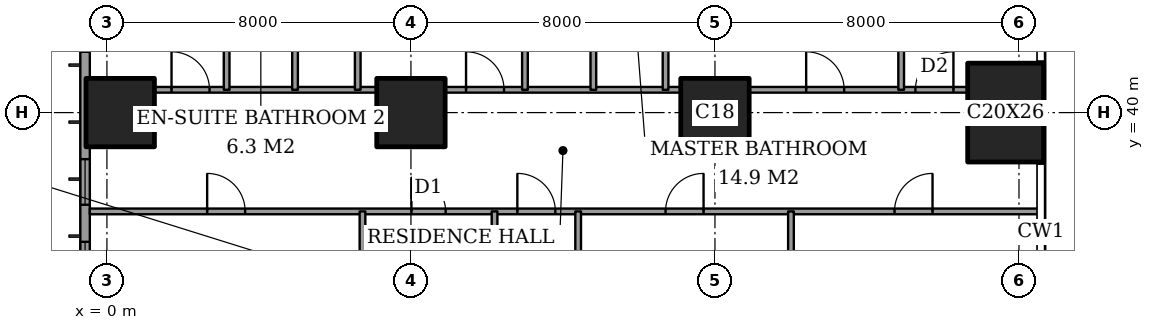
"""IFC4 building model, lengths in metres.
Left out: names, types, materials, properties, quantities, classifications, styles, units other than length and angle.
Written with IfcOpenShell. Run it as: python <this file> out.ifc"""

import sys

from ifc_helpers import new_model, si_unit, direction, frame, frame_2d, origin, origin_2d, place, context, subcontext, project, spatial, rectangle, extrude, element, fill, save


model = new_model("IFC4")
c1 = context("Model", 3, precision=1e-05, world=origin(), true_north=direction((0.0, 1.0)))
c2 = subcontext(c1, "Body", "Model", "MODEL_VIEW")
j1 = project(units=[si_unit("LENGTHUNIT", "METRE"), si_unit("PLANEANGLEUNIT", "RADIAN")], contexts=[c1])
p1 = place(None, origin())
s1 = spatial("IfcSite", under=j1, at=p1, CompositionType="ELEMENT")
p2 = place(p1, origin())
s2 = spatial("IfcBuilding", under=s1, at=p2, CompositionType="ELEMENT")
p3 = place(p2, frame((0.0, 0.0, 196.6)))
s3 = spatial("IfcBuildingStorey", under=s2, at=p3, CompositionType="ELEMENT", Elevation=196.6)
for number, where, z_axis, x_axis in (
    (1, (0.35, 40.0, 0.0), (0.0, 0.0, 1.0), (1.0, 0.0, 0.0)),
    (2, (8.0, 40.0, 0.0), (0.0, 0.0, 1.0), (1.0, 0.0, 0.0)),
    (3, (16.0, 40.0, 0.0), (0.0, 0.0, 1.0), (1.0, 0.0, 0.0)),
):
    element("IfcColumn", number, at=place(p3, frame(where, z_axis=z_axis, x_axis=x_axis)), inside=s3, PredefinedType="COLUMN", context=c2, shape_type="SweptSolid", body=[
        extrude(rectangle(XDim=1.8, YDim=1.8, at=origin_2d()), origin(), (0.0, 0.0, 1.0), 3.6),
    ])
p4 = place(p3, frame((23.65, 40.0, 0.0), z_axis=(0.0, 0.0, 1.0), x_axis=(1.0, 0.0, 0.0)))
e4 = element("IfcColumn", 4, at=p4, inside=s3, PredefinedType="COLUMN", context=c2, shape_type="SweptSolid", body=[
    extrude(rectangle(XDim=2.0, YDim=2.6, at=origin_2d()), origin(), (0.0, 0.0, 1.0), 3.6),
])
p5 = place(p3, frame((-0.575, 44.825, 0.0), z_axis=(0.0, 0.0, 1.0), x_axis=(0.0, -1.0, 0.0)))
e5 = element("IfcWall", 5, at=p5, inside=s3, PredefinedType="SOLIDWALL", context=c2, shape_type="SweptSolid", body=[
    extrude(rectangle(XDim=41.65, YDim=0.25, at=frame_2d((20.825, 0.0))), origin(), (0.0, 0.0, 1.0), 3.6),
])
p6 = place(p5, frame((0.825, 0.0, 0.2)))
e6 = element("IfcOpeningElement", 6, at=p6, cuts=e5, PredefinedType="OPENING", context=c2, shape_type="SweptSolid", body=[
    extrude(rectangle(XDim=2.4, YDim=2.4, at=frame_2d((1.2, 1.2))), frame((0.0, 0.135, 0.0), z_axis=(0.0, -1.0, 0.0), x_axis=(1.0, 0.0, 0.0)), (0.0, 0.0, 1.0), 0.27),
])
p7 = place(p5, frame((6.05, 0.0, 0.2)))
e7 = element("IfcOpeningElement", 7, at=p7, cuts=e5, PredefinedType="OPENING", context=c2, shape_type="SweptSolid", body=[
    extrude(rectangle(XDim=1.2, YDim=2.4, at=frame_2d((0.6, 1.2))), frame((0.0, 0.135, 0.0), z_axis=(0.0, -1.0, 0.0), x_axis=(1.0, 0.0, 0.0)), (0.0, 0.0, 1.0), 0.27),
])
p8 = place(p5, frame((8.225, 0.0, 0.2)))
e8 = element("IfcOpeningElement", 8, at=p8, cuts=e5, PredefinedType="OPENING", context=c2, shape_type="SweptSolid", body=[
    extrude(rectangle(XDim=2.4, YDim=2.4, at=frame_2d((1.2, 1.2))), frame((0.0, 0.135, 0.0), z_axis=(0.0, -1.0, 0.0), x_axis=(1.0, 0.0, 0.0)), (0.0, 0.0, 1.0), 0.27),
])
p9 = place(p5, frame((15.625, 0.0, 0.2)))
e9 = element("IfcOpeningElement", 9, at=p9, cuts=e5, PredefinedType="OPENING", context=c2, shape_type="SweptSolid", body=[
    extrude(rectangle(XDim=2.4, YDim=2.4, at=frame_2d((1.2, 1.2))), frame((0.0, 0.135, 0.0), z_axis=(0.0, -1.0, 0.0), x_axis=(1.0, 0.0, 0.0)), (0.0, 0.0, 1.0), 0.27),
])
p10 = place(p5, frame((23.625, 0.0, 0.2)))
e10 = element("IfcOpeningElement", 10, at=p10, cuts=e5, PredefinedType="OPENING", context=c2, shape_type="SweptSolid", body=[
    extrude(rectangle(XDim=2.4, YDim=2.4, at=frame_2d((1.2, 1.2))), frame((0.0, 0.135, 0.0), z_axis=(0.0, -1.0, 0.0), x_axis=(1.0, 0.0, 0.0)), (0.0, 0.0, 1.0), 0.27),
])
p11 = place(p5, frame((30.775, 0.0, 0.2)))
e11 = element("IfcOpeningElement", 11, at=p11, cuts=e5, PredefinedType="OPENING", context=c2, shape_type="SweptSolid", body=[
    extrude(rectangle(XDim=2.4, YDim=2.4, at=frame_2d((1.2, 1.2))), frame((0.0, 0.135, 0.0), z_axis=(0.0, -1.0, 0.0), x_axis=(1.0, 0.0, 0.0)), (0.0, 0.0, 1.0), 0.27),
])
p12 = place(p5, frame((34.55, 0.0, 0.2)))
e12 = element("IfcOpeningElement", 12, at=p12, cuts=e5, PredefinedType="OPENING", context=c2, shape_type="SweptSolid", body=[
    extrude(rectangle(XDim=1.2, YDim=2.4, at=frame_2d((0.6, 1.2))), frame((0.0, 0.135, 0.0), z_axis=(0.0, -1.0, 0.0), x_axis=(1.0, 0.0, 0.0)), (0.0, 0.0, 1.0), 0.27),
])
p13 = place(p5, frame((38.425, 0.0, 0.2)))
e13 = element("IfcOpeningElement", 13, at=p13, cuts=e5, PredefinedType="OPENING", context=c2, shape_type="SweptSolid", body=[
    extrude(rectangle(XDim=2.4, YDim=2.4, at=frame_2d((1.2, 1.2))), frame((0.0, 0.135, 0.0), z_axis=(0.0, -1.0, 0.0), x_axis=(1.0, 0.0, 0.0)), (0.0, 0.0, 1.0), 0.27),
])
p14 = place(p3, frame((-0.45, 37.4, 0.0), z_axis=(0.0, 0.0, 1.0), x_axis=(1.0, 0.0, 0.0)))
e14 = element("IfcWall", 14, at=p14, inside=s3, PredefinedType="PARTITIONING", context=c2, shape_type="SweptSolid", body=[
    extrude(rectangle(XDim=25.011, YDim=0.15, at=frame_2d((12.505, 0.0))), origin(), (0.0, 0.0, 1.0), 3.35),
])
p15 = place(p14, frame((11.25, 0.0, 0.0)))
e15 = element("IfcOpeningElement", 15, at=p15, cuts=e14, PredefinedType="OPENING", context=c2, shape_type="SweptSolid", body=[
    extrude(rectangle(XDim=1.0, YDim=2.1, at=frame_2d((0.5, 1.05))), frame((0.0, 0.085, 0.0), z_axis=(0.0, -1.0, 0.0), x_axis=(1.0, 0.0, 0.0)), (0.0, 0.0, 1.0), 0.17),
])
p16 = place(p14, frame((3.087, 0.0, 0.0)))
e16 = element("IfcOpeningElement", 16, at=p16, cuts=e14, PredefinedType="OPENING", context=c2, shape_type="SweptSolid", body=[
    extrude(rectangle(XDim=1.0, YDim=2.1, at=frame_2d((0.5, 1.05))), frame((0.0, 0.085, 0.0), z_axis=(0.0, -1.0, 0.0), x_axis=(1.0, 0.0, 0.0)), (0.0, 0.0, 1.0), 0.17),
])
p17 = place(p14, frame((8.462, 0.0, 0.0)))
e17 = element("IfcOpeningElement", 17, at=p17, cuts=e14, PredefinedType="OPENING", context=c2, shape_type="SweptSolid", body=[
    extrude(rectangle(XDim=0.9, YDim=2.1, at=frame_2d((0.45, 1.05))), frame((0.0, 0.085, 0.0), z_axis=(0.0, -1.0, 0.0), x_axis=(1.0, 0.0, 0.0)), (0.0, 0.0, 1.0), 0.17),
])
p18 = place(p14, frame((15.15, 0.0, 0.0)))
e18 = element("IfcOpeningElement", 18, at=p18, cuts=e14, PredefinedType="OPENING", context=c2, shape_type="SweptSolid", body=[
    extrude(rectangle(XDim=1.0, YDim=2.1, at=frame_2d((0.5, 1.05))), frame((0.0, 0.085, 0.0), z_axis=(0.0, -1.0, 0.0), x_axis=(1.0, 0.0, 0.0)), (0.0, 0.0, 1.0), 0.17),
])
p19 = place(p14, frame((21.175, 0.0, 0.0)))
e19 = element("IfcOpeningElement", 19, at=p19, cuts=e14, PredefinedType="OPENING", context=c2, shape_type="SweptSolid", body=[
    extrude(rectangle(XDim=1.0, YDim=2.1, at=frame_2d((0.5, 1.05))), frame((0.0, 0.085, 0.0), z_axis=(0.0, -1.0, 0.0), x_axis=(1.0, 0.0, 0.0)), (0.0, 0.0, 1.0), 0.17),
])
p20 = place(p3, frame((1.25, 40.6, 0.0), z_axis=(0.0, 0.0, 1.0), x_axis=(1.0, 0.0, 0.0)))
e20 = element("IfcWall", 20, at=p20, inside=s3, PredefinedType="PARTITIONING", context=c2, shape_type="SweptSolid", body=[
    extrude(rectangle(XDim=5.85, YDim=0.15, at=frame_2d((2.925, 0.0))), origin(), (0.0, 0.0, 1.0), 3.35),
])
p21 = place(p20, frame((0.45, 0.0, 0.0)))
e21 = element("IfcOpeningElement", 21, at=p21, cuts=e20, PredefinedType="OPENING", context=c2, shape_type="SweptSolid", body=[
    extrude(rectangle(XDim=1.0, YDim=2.1, at=frame_2d((0.5, 1.05))), frame((0.0, 0.085, 0.0), z_axis=(0.0, -1.0, 0.0), x_axis=(1.0, 0.0, 0.0)), (0.0, 0.0, 1.0), 0.17),
])
p22 = place(p3, frame((8.9, 40.6, 0.0), z_axis=(0.0, 0.0, 1.0), x_axis=(1.0, 0.0, 0.0)))
e22 = element("IfcWall", 22, at=p22, inside=s3, PredefinedType="PARTITIONING", context=c2, shape_type="SweptSolid", body=[
    extrude(rectangle(XDim=6.2, YDim=0.15, at=frame_2d((3.1, 0.0))), origin(), (0.0, 0.0, 1.0), 3.35),
])
p23 = place(p22, frame((0.55, 0.0, 0.0)))
e23 = element("IfcOpeningElement", 23, at=p23, cuts=e22, PredefinedType="OPENING", context=c2, shape_type="SweptSolid", body=[
    extrude(rectangle(XDim=1.0, YDim=2.1, at=frame_2d((0.5, 1.05))), frame((0.0, 0.085, 0.0), z_axis=(0.0, -1.0, 0.0), x_axis=(1.0, 0.0, 0.0)), (0.0, 0.0, 1.0), 0.17),
])
p24 = place(p3, frame((16.9, 40.6, 0.0), z_axis=(0.0, 0.0, 1.0), x_axis=(1.0, 0.0, 0.0)))
e24 = element("IfcWall", 24, at=p24, inside=s3, PredefinedType="PARTITIONING", context=c2, shape_type="SweptSolid", body=[
    extrude(rectangle(XDim=5.75, YDim=0.15, at=frame_2d((2.875, 0.0))), origin(), (0.0, 0.0, 1.0), 3.35),
])
p25 = place(p24, frame((1.5, 0.0, 0.0)))
e25 = element("IfcOpeningElement", 25, at=p25, cuts=e24, PredefinedType="OPENING", context=c2, shape_type="SweptSolid", body=[
    extrude(rectangle(XDim=1.0, YDim=2.1, at=frame_2d((0.5, 1.05))), frame((0.0, 0.085, 0.0), z_axis=(0.0, -1.0, 0.0), x_axis=(1.0, 0.0, 0.0)), (0.0, 0.0, 1.0), 0.17),
])
p26 = place(p24, frame((4.375, 0.0, 0.0)))
e26 = element("IfcOpeningElement", 26, at=p26, cuts=e24, PredefinedType="OPENING", context=c2, shape_type="SweptSolid", body=[
    extrude(rectangle(XDim=1.0, YDim=2.1, at=frame_2d((0.5, 1.05))), frame((0.0, 0.085, 0.0), z_axis=(0.0, -1.0, 0.0), x_axis=(1.0, 0.0, 0.0)), (0.0, 0.0, 1.0), 0.17),
])
p27 = place(p3, frame((3.15, 40.6, 0.0), z_axis=(0.0, 0.0, 1.0), x_axis=(0.0, 1.0, 0.0)))
e27 = element("IfcWall", 27, at=p27, inside=s3, PredefinedType="PARTITIONING", context=c2, shape_type="SweptSolid", body=[
    extrude(rectangle(XDim=3.5, YDim=0.15, at=frame_2d((1.75, 0.0))), origin(), (0.0, 0.0, 1.0), 3.35),
])
p28 = place(p27, frame((1.3, 0.0, 0.0)))
e28 = element("IfcOpeningElement", 28, at=p28, cuts=e27, PredefinedType="OPENING", context=c2, shape_type="SweptSolid", body=[
    extrude(rectangle(XDim=0.9, YDim=2.1, at=frame_2d((0.45, 1.05))), frame((0.0, 0.085, 0.0), z_axis=(0.0, -1.0, 0.0), x_axis=(1.0, 0.0, 0.0)), (0.0, 0.0, 1.0), 0.17),
])
p29 = place(p3, frame((4.95, 40.6, 0.0), z_axis=(0.0, 0.0, 1.0), x_axis=(0.0, 1.0, 0.0)))
e29 = element("IfcWall", 29, at=p29, inside=s3, PredefinedType="PARTITIONING", context=c2, shape_type="SweptSolid", body=[
    extrude(rectangle(XDim=7.85, YDim=0.15, at=frame_2d((3.925, 0.0))), origin(), (0.0, 0.0, 1.0), 3.35),
])
p30 = place(p29, frame((5.225, 0.0, 0.0)))
e30 = element("IfcOpeningElement", 30, at=p30, cuts=e29, PredefinedType="OPENING", context=c2, shape_type="SweptSolid", body=[
    extrude(rectangle(XDim=0.9, YDim=2.1, at=frame_2d((0.45, 1.05))), frame((0.0, 0.085, 0.0), z_axis=(0.0, -1.0, 0.0), x_axis=(1.0, 0.0, 0.0)), (0.0, 0.0, 1.0), 0.17),
])
p31 = place(p3, frame((6.6, 40.6, 0.0), z_axis=(0.0, 0.0, 1.0), x_axis=(0.0, 1.0, 0.0)))
e31 = element("IfcWall", 31, at=p31, inside=s3, PredefinedType="PARTITIONING", context=c2, shape_type="SweptSolid", body=[
    extrude(rectangle(XDim=7.85, YDim=0.15, at=frame_2d((3.925, 0.0))), origin(), (0.0, 0.0, 1.0), 3.35),
])
p32 = place(p3, frame((6.725, 33.2, 0.0), z_axis=(0.0, 0.0, 1.0), x_axis=(0.0, 1.0, 0.0)))
e32 = element("IfcWall", 32, at=p32, inside=s3, PredefinedType="PARTITIONING", context=c2, shape_type="SweptSolid", body=[
    extrude(rectangle(XDim=4.2, YDim=0.15, at=frame_2d((2.1, 0.0))), origin(), (0.0, 0.0, 1.0), 3.35),
])
p33 = place(p3, frame((10.2, 28.0, 0.0), z_axis=(0.0, 0.0, 1.0), x_axis=(0.0, 1.0, 0.0)))
e33 = element("IfcWall", 33, at=p33, inside=s3, PredefinedType="PARTITIONING", context=c2, shape_type="SweptSolid", body=[
    extrude(rectangle(XDim=9.4, YDim=0.15, at=frame_2d((4.7, 0.0))), origin(), (0.0, 0.0, 1.0), 3.35),
])
p34 = place(p33, frame((0.837, 0.0, 0.0)))
e34 = element("IfcOpeningElement", 34, at=p34, cuts=e33, PredefinedType="OPENING", context=c2, shape_type="SweptSolid", body=[
    extrude(rectangle(XDim=1.0, YDim=2.1, at=frame_2d((0.5, 1.05))), frame((0.0, 0.085, 0.0), z_axis=(0.0, -1.0, 0.0), x_axis=(1.0, 0.0, 0.0)), (0.0, 0.0, 1.0), 0.17),
])
p35 = place(p3, frame((11.0, 40.6, 0.0), z_axis=(0.0, 0.0, 1.0), x_axis=(0.0, 1.0, 0.0)))
e35 = element("IfcWall", 35, at=p35, inside=s3, PredefinedType="PARTITIONING", context=c2, shape_type="SweptSolid", body=[
    extrude(rectangle(XDim=7.85, YDim=0.15, at=frame_2d((3.925, 0.0))), origin(), (0.0, 0.0, 1.0), 3.35),
])
p36 = place(p35, frame((3.475, 0.0, 0.0)))
e36 = element("IfcOpeningElement", 36, at=p36, cuts=e35, PredefinedType="OPENING", context=c2, shape_type="SweptSolid", body=[
    extrude(rectangle(XDim=0.9, YDim=2.1, at=frame_2d((0.45, 1.05))), frame((0.0, 0.085, 0.0), z_axis=(0.0, -1.0, 0.0), x_axis=(1.0, 0.0, 0.0)), (0.0, 0.0, 1.0), 0.17),
])
p37 = place(p3, frame((12.4, 30.675, 0.0), z_axis=(0.0, 0.0, 1.0), x_axis=(0.0, 1.0, 0.0)))
e37 = element("IfcWall", 37, at=p37, inside=s3, PredefinedType="PARTITIONING", context=c2, shape_type="SweptSolid", body=[
    extrude(rectangle(XDim=6.725, YDim=0.15, at=frame_2d((3.362, 0.0))), origin(), (0.0, 0.0, 1.0), 3.35),
])
p38 = place(p3, frame((12.8, 40.6, 0.0), z_axis=(0.0, 0.0, 1.0), x_axis=(0.0, 1.0, 0.0)))
e38 = element("IfcWall", 38, at=p38, inside=s3, PredefinedType="PARTITIONING", context=c2, shape_type="SweptSolid", body=[
    extrude(rectangle(XDim=7.85, YDim=0.15, at=frame_2d((3.925, 0.0))), origin(), (0.0, 0.0, 1.0), 3.35),
])
p39 = place(p3, frame((14.7, 40.6, 0.0), z_axis=(0.0, 0.0, 1.0), x_axis=(0.0, 1.0, 0.0)))
e39 = element("IfcWall", 39, at=p39, inside=s3, PredefinedType="PARTITIONING", context=c2, shape_type="SweptSolid", body=[
    extrude(rectangle(XDim=7.85, YDim=0.15, at=frame_2d((3.925, 0.0))), origin(), (0.0, 0.0, 1.0), 3.35),
])
p40 = place(p39, frame((3.475, 0.0, 0.0)))
e40 = element("IfcOpeningElement", 40, at=p40, cuts=e39, PredefinedType="OPENING", context=c2, shape_type="SweptSolid", body=[
    extrude(rectangle(XDim=0.9, YDim=2.1, at=frame_2d((0.45, 1.05))), frame((0.0, 0.085, 0.0), z_axis=(0.0, -1.0, 0.0), x_axis=(1.0, 0.0, 0.0)), (0.0, 0.0, 1.0), 0.17),
])
p41 = place(p3, frame((18.0, 28.0, 0.0), z_axis=(0.0, 0.0, 1.0), x_axis=(0.0, 1.0, 0.0)))
e41 = element("IfcWall", 41, at=p41, inside=s3, PredefinedType="PARTITIONING", context=c2, shape_type="SweptSolid", body=[
    extrude(rectangle(XDim=9.4, YDim=0.15, at=frame_2d((4.7, 0.0))), origin(), (0.0, 0.0, 1.0), 3.35),
])
p42 = place(p41, frame((0.837, 0.0, 0.0)))
e42 = element("IfcOpeningElement", 42, at=p42, cuts=e41, PredefinedType="OPENING", context=c2, shape_type="SweptSolid", body=[
    extrude(rectangle(XDim=1.0, YDim=2.1, at=frame_2d((0.5, 1.05))), frame((0.0, 0.085, 0.0), z_axis=(0.0, -1.0, 0.0), x_axis=(1.0, 0.0, 0.0)), (0.0, 0.0, 1.0), 0.17),
])
p43 = place(p3, frame((20.9, 40.6, 0.0), z_axis=(0.0, 0.0, 1.0), x_axis=(0.0, 1.0, 0.0)))
e43 = element("IfcWall", 43, at=p43, inside=s3, PredefinedType="PARTITIONING", context=c2, shape_type="SweptSolid", body=[
    extrude(rectangle(XDim=7.85, YDim=0.15, at=frame_2d((3.925, 0.0))), origin(), (0.0, 0.0, 1.0), 3.35),
])
p44 = place(p7, origin())
e44 = element("IfcWindow", 44, at=p44, inside=s3, PartitioningType="SINGLE_PANEL", PredefinedType="WINDOW", context=c2, shape_type="SweptSolid", body=[
    extrude(rectangle(XDim=1.2, YDim=2.4, at=frame_2d((0.6, 1.2))), frame((0.0, 0.03, 0.0), z_axis=(0.0, -1.0, 0.0), x_axis=(1.0, 0.0, 0.0)), (0.0, 0.0, 1.0), 0.06),
])
fill(e7, e44)
p45 = place(p8, origin())
e45 = element("IfcWindow", 45, at=p45, inside=s3, PartitioningType="SINGLE_PANEL", PredefinedType="WINDOW", context=c2, shape_type="SweptSolid", body=[
    extrude(rectangle(XDim=2.4, YDim=2.4, at=frame_2d((1.2, 1.2))), frame((0.0, 0.03, 0.0), z_axis=(0.0, -1.0, 0.0), x_axis=(1.0, 0.0, 0.0)), (0.0, 0.0, 1.0), 0.06),
])
fill(e8, e45)
p46 = place(p21, origin())
e46 = element("IfcDoor", 46, at=p46, inside=s3, OperationType="SINGLE_SWING_RIGHT", PredefinedType="DOOR", context=c2, shape_type="SweptSolid", body=[
    extrude(rectangle(XDim=1.0, YDim=2.1, at=frame_2d((0.5, 1.05))), frame((0.0, 0.025, 0.0), z_axis=(0.0, -1.0, 0.0), x_axis=(1.0, 0.0, 0.0)), (0.0, 0.0, 1.0), 0.05),
])
fill(e21, e46)
p47 = place(p23, origin())
e47 = element("IfcDoor", 47, at=p47, inside=s3, OperationType="SINGLE_SWING_RIGHT", PredefinedType="DOOR", context=c2, shape_type="SweptSolid", body=[
    extrude(rectangle(XDim=1.0, YDim=2.1, at=frame_2d((0.5, 1.05))), frame((0.0, 0.025, 0.0), z_axis=(0.0, -1.0, 0.0), x_axis=(1.0, 0.0, 0.0)), (0.0, 0.0, 1.0), 0.05),
])
fill(e23, e47)
p48 = place(p25, origin())
e48 = element("IfcDoor", 48, at=p48, inside=s3, OperationType="SINGLE_SWING_RIGHT", PredefinedType="DOOR", context=c2, shape_type="SweptSolid", body=[
    extrude(rectangle(XDim=1.0, YDim=2.1, at=frame_2d((0.5, 1.05))), frame((0.0, 0.025, 0.0), z_axis=(0.0, -1.0, 0.0), x_axis=(1.0, 0.0, 0.0)), (0.0, 0.0, 1.0), 0.05),
])
fill(e25, e48)
p49 = place(p26, origin())
e49 = element("IfcDoor", 49, at=p49, inside=s3, OperationType="SINGLE_SWING_LEFT", PredefinedType="DOOR", context=c2, shape_type="SweptSolid", body=[
    extrude(rectangle(XDim=1.0, YDim=2.1, at=frame_2d((0.5, 1.05))), frame((0.0, 0.025, 0.0), z_axis=(0.0, -1.0, 0.0), x_axis=(1.0, 0.0, 0.0)), (0.0, 0.0, 1.0), 0.05),
])
fill(e26, e49)
p50 = place(p15, origin())
e50 = element("IfcDoor", 50, at=p50, inside=s3, OperationType="SINGLE_SWING_RIGHT", PredefinedType="DOOR", context=c2, shape_type="SweptSolid", body=[
    extrude(rectangle(XDim=1.0, YDim=2.1, at=frame_2d((0.5, 1.05))), frame((0.0, 0.025, 0.0), z_axis=(0.0, -1.0, 0.0), x_axis=(1.0, 0.0, 0.0)), (0.0, 0.0, 1.0), 0.05),
])
fill(e15, e50)
p51 = place(p16, origin())
e51 = element("IfcDoor", 51, at=p51, inside=s3, OperationType="SINGLE_SWING_RIGHT", PredefinedType="DOOR", context=c2, shape_type="SweptSolid", body=[
    extrude(rectangle(XDim=1.0, YDim=2.1, at=frame_2d((0.5, 1.05))), frame((0.0, 0.025, 0.0), z_axis=(0.0, -1.0, 0.0), x_axis=(1.0, 0.0, 0.0)), (0.0, 0.0, 1.0), 0.05),
])
fill(e16, e51)
p52 = place(p17, origin())
e52 = element("IfcDoor", 52, at=p52, inside=s3, OperationType="SINGLE_SWING_RIGHT", PredefinedType="DOOR", context=c2, shape_type="SweptSolid", body=[
    extrude(rectangle(XDim=0.9, YDim=2.1, at=frame_2d((0.45, 1.05))), frame((0.0, 0.025, 0.0), z_axis=(0.0, -1.0, 0.0), x_axis=(1.0, 0.0, 0.0)), (0.0, 0.0, 1.0), 0.05),
])
fill(e17, e52)
p53 = place(p18, origin())
e53 = element("IfcDoor", 53, at=p53, inside=s3, OperationType="SINGLE_SWING_LEFT", PredefinedType="DOOR", context=c2, shape_type="SweptSolid", body=[
    extrude(rectangle(XDim=1.0, YDim=2.1, at=frame_2d((0.5, 1.05))), frame((0.0, 0.025, 0.0), z_axis=(0.0, -1.0, 0.0), x_axis=(1.0, 0.0, 0.0)), (0.0, 0.0, 1.0), 0.05),
])
fill(e18, e53)
p54 = place(p19, origin())
e54 = element("IfcDoor", 54, at=p54, inside=s3, OperationType="SINGLE_SWING_LEFT", PredefinedType="DOOR", context=c2, shape_type="SweptSolid", body=[
    extrude(rectangle(XDim=1.0, YDim=2.1, at=frame_2d((0.5, 1.05))), frame((0.0, 0.025, 0.0), z_axis=(0.0, -1.0, 0.0), x_axis=(1.0, 0.0, 0.0)), (0.0, 0.0, 1.0), 0.05),
])
fill(e19, e54)
save(model, sys.argv[1])
